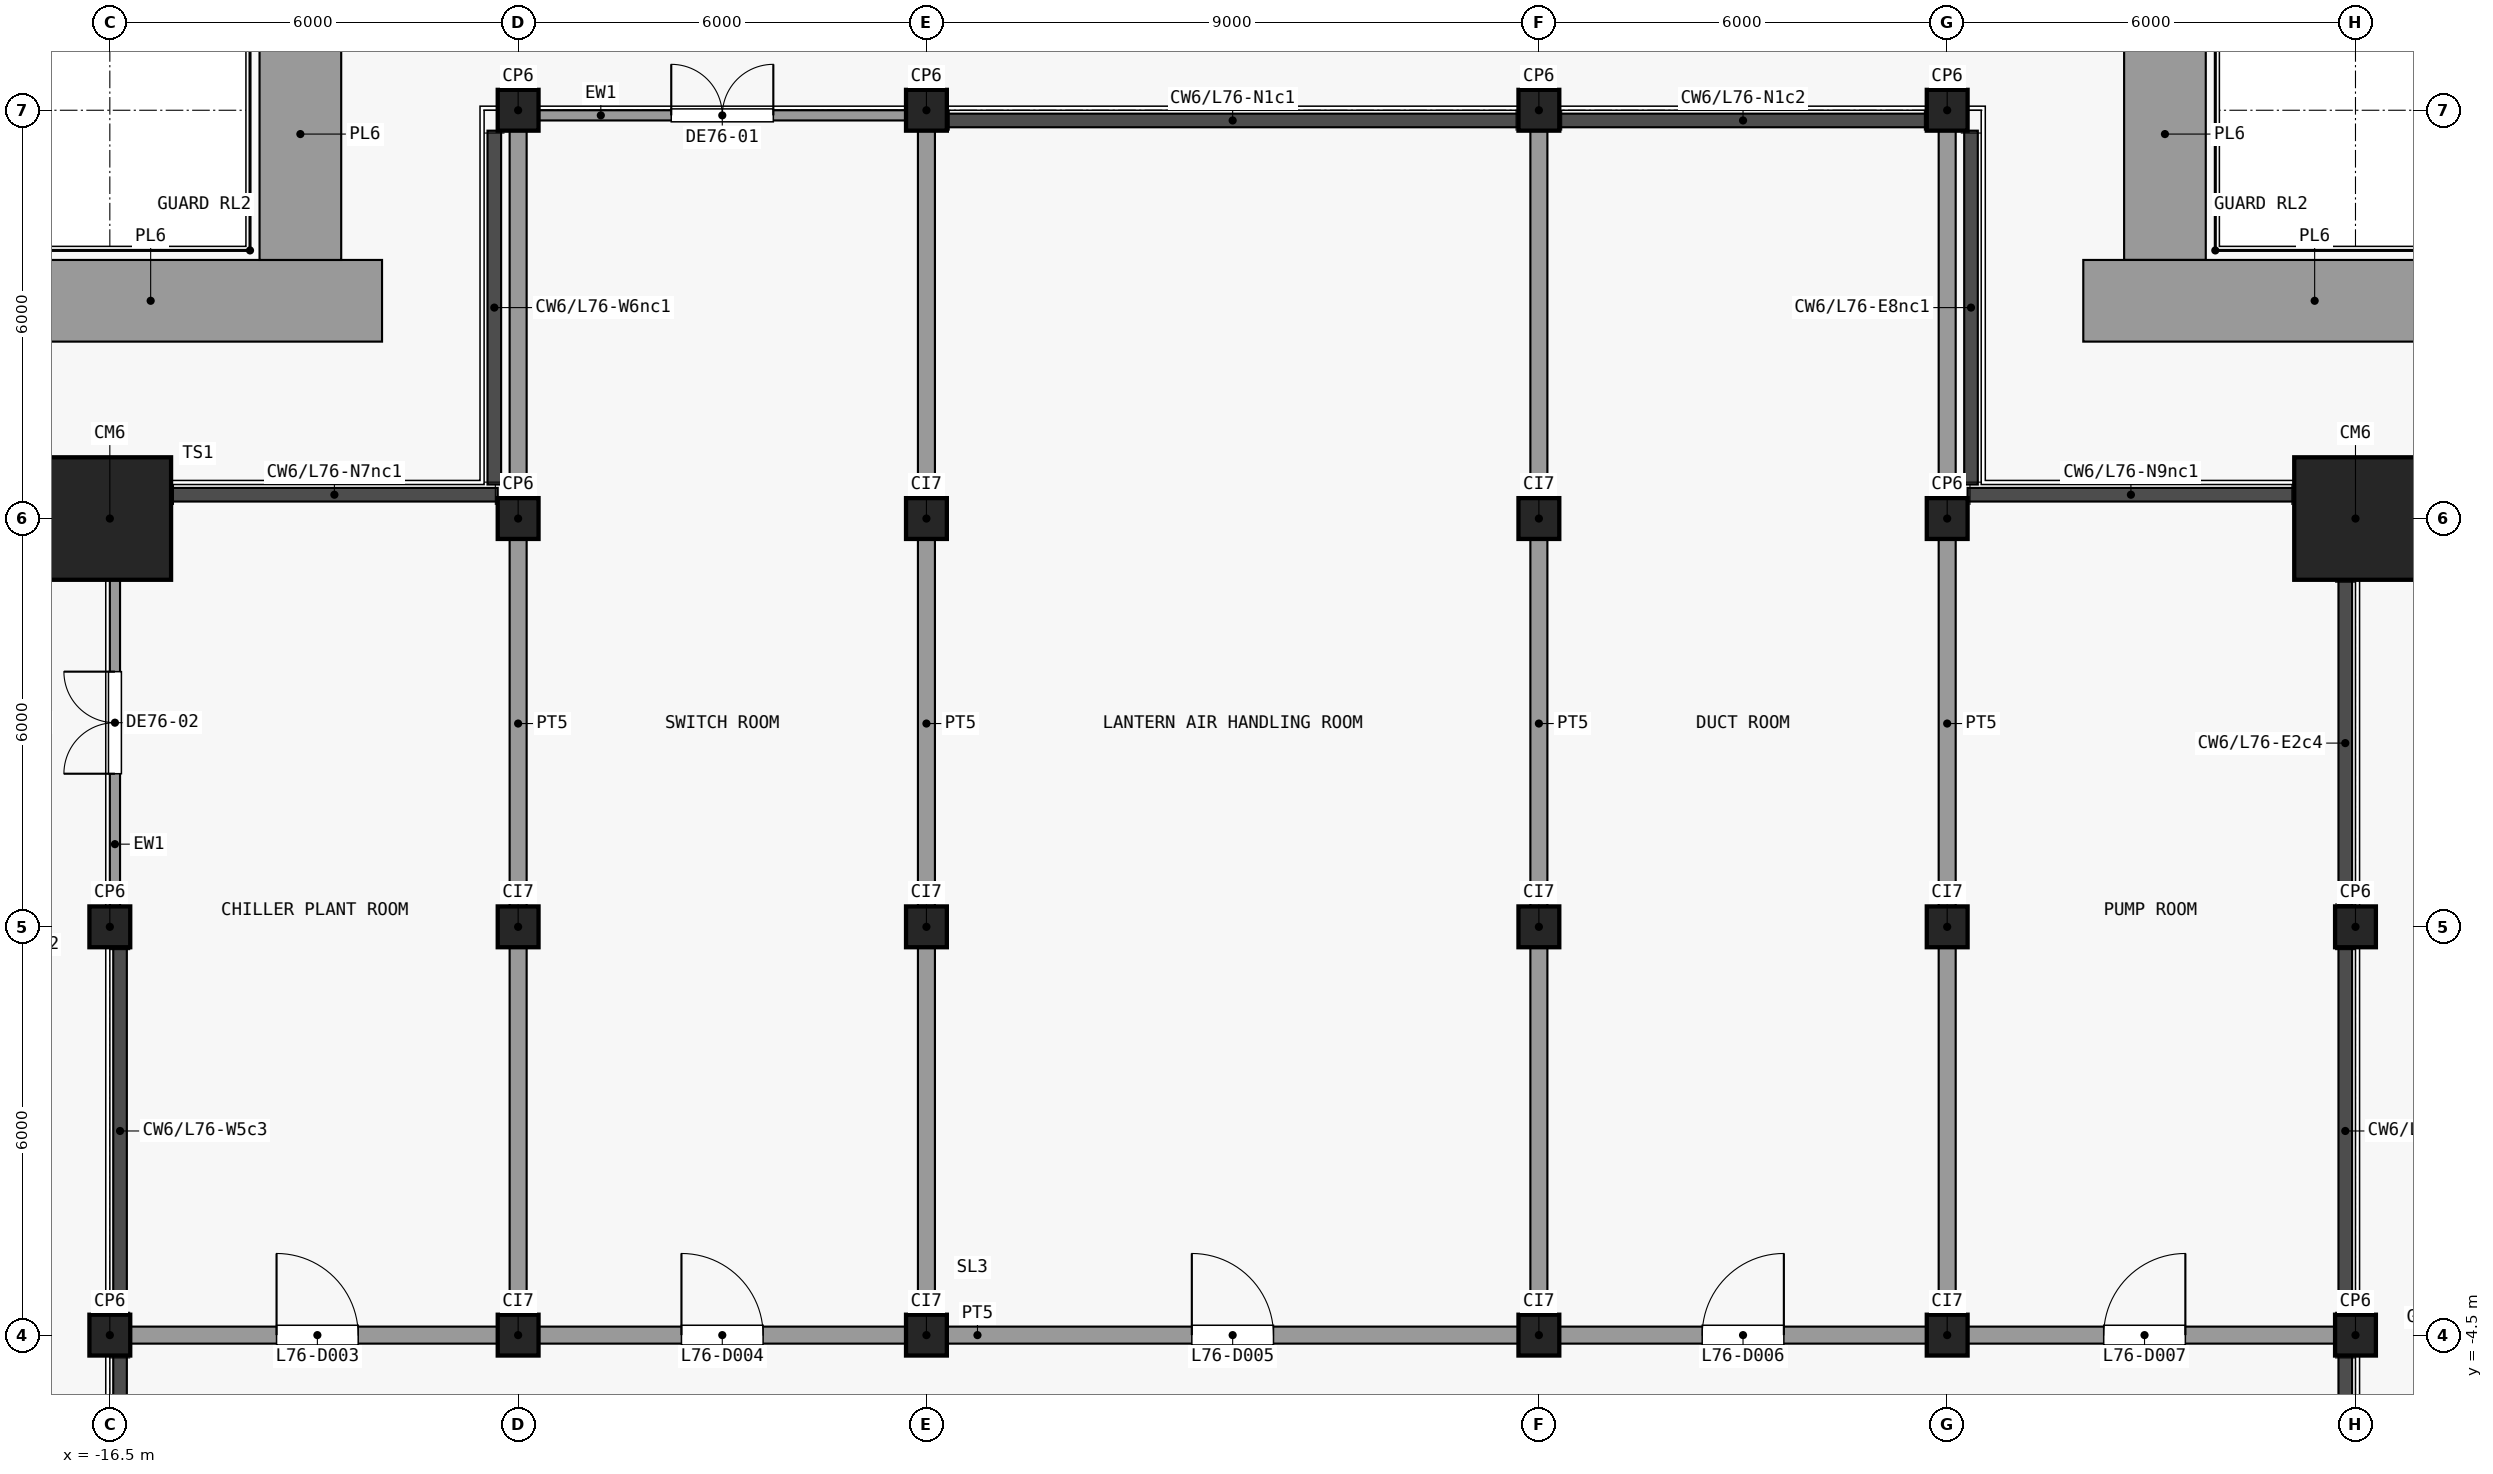
"""IFC4 building model, lengths in metres.
Left out: names, types, materials, properties, quantities, classifications, styles, units other than length and angle.
Written with IfcOpenShell. Run it as: python <this file> out.ifc"""

import sys

from ifc_helpers import new_model, si_unit, direction, frame, frame_2d, origin, origin_2d, place, context, subcontext, project, spatial, rectangle, extrude, element, fill, save


model = new_model("IFC4")
c1 = context("Model", 3, precision=1e-05, world=origin(), true_north=direction((0.0, 1.0)))
c2 = subcontext(c1, "Body", "Model", "MODEL_VIEW")
j1 = project(units=[si_unit("LENGTHUNIT", "METRE"), si_unit("PLANEANGLEUNIT", "RADIAN")], contexts=[c1])
p1 = place(None, origin())
s1 = spatial("IfcSite", under=j1, at=p1, CompositionType="ELEMENT")
p2 = place(p1, origin())
s2 = spatial("IfcBuilding", under=s1, at=p2, CompositionType="ELEMENT")
p3 = place(p2, frame((0.0, 0.0, 298.7)))
s3 = spatial("IfcBuildingStorey", under=s2, at=p3, CompositionType="ELEMENT", Elevation=298.7)
for number, where, z_axis, x_axis in (
    (1, (-16.5, -4.5, 0.0), (0.0, 0.0, 1.0), (1.0, 0.0, 0.0)),
    (2, (-16.5, 1.5, 0.0), (0.0, 0.0, 1.0), (1.0, 0.0, 0.0)),
):
    element("IfcColumn", number, at=place(p3, frame(where, z_axis=z_axis, x_axis=x_axis)), inside=s3, PredefinedType="COLUMN", context=c2, shape_type="SweptSolid", body=[
        extrude(rectangle(XDim=0.6, YDim=0.6, at=origin_2d()), origin(), (0.0, 0.0, 1.0), 4.5),
    ])
p4 = place(p3, frame((-16.5, 7.5, 0.0), z_axis=(0.0, 0.0, 1.0), x_axis=(1.0, 0.0, 0.0)))
e3 = element("IfcColumn", 3, at=p4, inside=s3, PredefinedType="COLUMN", context=c2, shape_type="SweptSolid", body=[
    extrude(rectangle(XDim=1.8, YDim=1.8, at=origin_2d()), origin(), (0.0, 0.0, 1.0), 4.5),
])
for number, where, z_axis, x_axis in (
    (4, (-10.5, -4.5, 0.0), (0.0, 0.0, 1.0), (1.0, 0.0, 0.0)),
    (5, (-10.5, 1.5, 0.0), (0.0, 0.0, 1.0), (1.0, 0.0, 0.0)),
    (6, (-10.5, 7.5, 0.0), (0.0, 0.0, 1.0), (1.0, 0.0, 0.0)),
    (7, (-10.5, 13.5, 0.0), (0.0, 0.0, 1.0), (1.0, 0.0, 0.0)),
    (8, (-4.5, -4.5, 0.0), (0.0, 0.0, 1.0), (1.0, 0.0, 0.0)),
    (9, (-4.5, 1.5, 0.0), (0.0, 0.0, 1.0), (1.0, 0.0, 0.0)),
    (10, (-4.5, 7.5, 0.0), (0.0, 0.0, 1.0), (1.0, 0.0, 0.0)),
    (11, (-4.5, 13.5, 0.0), (0.0, 0.0, 1.0), (1.0, 0.0, 0.0)),
    (12, (4.5, -4.5, 0.0), (0.0, 0.0, 1.0), (1.0, 0.0, 0.0)),
    (13, (4.5, 1.5, 0.0), (0.0, 0.0, 1.0), (1.0, 0.0, 0.0)),
    (14, (4.5, 7.5, 0.0), (0.0, 0.0, 1.0), (1.0, 0.0, 0.0)),
    (15, (4.5, 13.5, 0.0), (0.0, 0.0, 1.0), (1.0, 0.0, 0.0)),
    (16, (10.5, -4.5, 0.0), (0.0, 0.0, 1.0), (1.0, 0.0, 0.0)),
    (17, (10.5, 1.5, 0.0), (0.0, 0.0, 1.0), (1.0, 0.0, 0.0)),
    (18, (10.5, 7.5, 0.0), (0.0, 0.0, 1.0), (1.0, 0.0, 0.0)),
    (19, (10.5, 13.5, 0.0), (0.0, 0.0, 1.0), (1.0, 0.0, 0.0)),
    (20, (16.5, -4.5, 0.0), (0.0, 0.0, 1.0), (1.0, 0.0, 0.0)),
    (21, (16.5, 1.5, 0.0), (0.0, 0.0, 1.0), (1.0, 0.0, 0.0)),
):
    element("IfcColumn", number, at=place(p3, frame(where, z_axis=z_axis, x_axis=x_axis)), inside=s3, PredefinedType="COLUMN", context=c2, shape_type="SweptSolid", body=[
        extrude(rectangle(XDim=0.6, YDim=0.6, at=origin_2d()), origin(), (0.0, 0.0, 1.0), 4.5),
    ])
p5 = place(p3, frame((16.5, 7.5, 0.0), z_axis=(0.0, 0.0, 1.0), x_axis=(1.0, 0.0, 0.0)))
e22 = element("IfcColumn", 22, at=p5, inside=s3, PredefinedType="COLUMN", context=c2, shape_type="SweptSolid", body=[
    extrude(rectangle(XDim=1.8, YDim=1.8, at=origin_2d()), origin(), (0.0, 0.0, 1.0), 4.5),
])
p6 = place(p3, frame((-10.2, 13.425, 0.0), z_axis=(0.0, 0.0, 1.0), x_axis=(1.0, 0.0, 0.0)))
e23 = element("IfcWall", 23, at=p6, inside=s3, PredefinedType="SOLIDWALL", context=c2, shape_type="SweptSolid", body=[
    extrude(rectangle(XDim=5.4, YDim=0.15, at=frame_2d((2.7, 0.0))), origin(), (0.0, 0.0, 1.0), 4.2),
])
p7 = place(p6, frame((1.95, 0.0, 0.0)))
e24 = element("IfcOpeningElement", 24, at=p7, cuts=e23, PredefinedType="OPENING", context=c2, shape_type="SweptSolid", body=[
    extrude(rectangle(XDim=1.5, YDim=2.4, at=frame_2d((0.75, 1.2))), frame((0.0, 0.085, 0.0), z_axis=(0.0, -1.0, 0.0), x_axis=(1.0, 0.0, 0.0)), (0.0, 0.0, 1.0), 0.17),
])
p8 = place(p3, frame((-16.425, 1.8, 0.0), z_axis=(0.0, 0.0, 1.0), x_axis=(0.0, 1.0, 0.0)))
e25 = element("IfcWall", 25, at=p8, inside=s3, PredefinedType="SOLIDWALL", context=c2, shape_type="SweptSolid", body=[
    extrude(rectangle(XDim=4.8, YDim=0.15, at=frame_2d((2.4, 0.0))), origin(), (0.0, 0.0, 1.0), 4.2),
])
p9 = place(p8, frame((1.95, 0.0, 0.0)))
e26 = element("IfcOpeningElement", 26, at=p9, cuts=e25, PredefinedType="OPENING", context=c2, shape_type="SweptSolid", body=[
    extrude(rectangle(XDim=1.5, YDim=2.4, at=frame_2d((0.75, 1.2))), frame((0.0, 0.085, 0.0), z_axis=(0.0, -1.0, 0.0), x_axis=(1.0, 0.0, 0.0)), (0.0, 0.0, 1.0), 0.17),
])
p10 = place(p3, frame((-19.3, 10.7, 0.0), z_axis=(0.0, 0.0, 1.0), x_axis=(1.0, 0.0, 0.0)))
e27 = element("IfcWall", 27, at=p10, inside=s3, PredefinedType="USERDEFINED", context=c2, shape_type="SweptSolid", body=[
    extrude(rectangle(XDim=6.8, YDim=1.2, at=frame_2d((3.4, 0.0))), origin(), (0.0, 0.0, 1.0), 0.9),
])
for number, where, z_axis, x_axis in (
    (28, (-13.7, 11.3, 0.0), (0.0, 0.0, 1.0), (0.0, 1.0, 0.0)),
    (29, (13.7, 11.3, 0.0), (0.0, 0.0, 1.0), (0.0, 1.0, 0.0)),
):
    element("IfcWall", number, at=place(p3, frame(where, z_axis=z_axis, x_axis=x_axis)), inside=s3, PredefinedType="USERDEFINED", context=c2, shape_type="SweptSolid", body=[
        extrude(rectangle(XDim=3.7, YDim=1.2, at=frame_2d((1.85, 0.0))), origin(), (0.0, 0.0, 1.0), 0.9),
    ])
p11 = place(p3, frame((12.5, 10.7, 0.0), z_axis=(0.0, 0.0, 1.0), x_axis=(1.0, 0.0, 0.0)))
e30 = element("IfcWall", 30, at=p11, inside=s3, PredefinedType="USERDEFINED", context=c2, shape_type="SweptSolid", body=[
    extrude(rectangle(XDim=6.8, YDim=1.2, at=frame_2d((3.4, 0.0))), origin(), (0.0, 0.0, 1.0), 0.9),
])
p12 = place(p3, frame((-16.35, -4.5, 0.0), z_axis=(0.0, 0.0, 1.0), x_axis=(1.0, 0.0, 0.0)))
e31 = element("IfcWall", 31, at=p12, inside=s3, PredefinedType="PARTITIONING", context=c2, shape_type="SweptSolid", body=[
    extrude(rectangle(XDim=32.7, YDim=0.25, at=frame_2d((16.35, 0.0))), origin(), (0.0, 0.0, 1.0), 4.2),
])
p13 = place(p12, frame((2.3, 0.0, 0.0)))
e32 = element("IfcOpeningElement", 32, at=p13, cuts=e31, PredefinedType="OPENING", context=c2, shape_type="SweptSolid", body=[
    extrude(rectangle(XDim=1.2, YDim=2.1, at=frame_2d((0.6, 1.05))), frame((0.0, 0.135, 0.0), z_axis=(0.0, -1.0, 0.0), x_axis=(1.0, 0.0, 0.0)), (0.0, 0.0, 1.0), 0.27),
])
p14 = place(p12, frame((8.25, 0.0, 0.0)))
e33 = element("IfcOpeningElement", 33, at=p14, cuts=e31, PredefinedType="OPENING", context=c2, shape_type="SweptSolid", body=[
    extrude(rectangle(XDim=1.2, YDim=2.1, at=frame_2d((0.6, 1.05))), frame((0.0, 0.135, 0.0), z_axis=(0.0, -1.0, 0.0), x_axis=(1.0, 0.0, 0.0)), (0.0, 0.0, 1.0), 0.27),
])
p15 = place(p12, frame((15.75, 0.0, 0.0)))
e34 = element("IfcOpeningElement", 34, at=p15, cuts=e31, PredefinedType="OPENING", context=c2, shape_type="SweptSolid", body=[
    extrude(rectangle(XDim=1.2, YDim=2.1, at=frame_2d((0.6, 1.05))), frame((0.0, 0.135, 0.0), z_axis=(0.0, -1.0, 0.0), x_axis=(1.0, 0.0, 0.0)), (0.0, 0.0, 1.0), 0.27),
])
p16 = place(p12, frame((23.25, 0.0, 0.0)))
e35 = element("IfcOpeningElement", 35, at=p16, cuts=e31, PredefinedType="OPENING", context=c2, shape_type="SweptSolid", body=[
    extrude(rectangle(XDim=1.2, YDim=2.1, at=frame_2d((0.6, 1.05))), frame((0.0, 0.135, 0.0), z_axis=(0.0, -1.0, 0.0), x_axis=(1.0, 0.0, 0.0)), (0.0, 0.0, 1.0), 0.27),
])
p17 = place(p12, frame((29.15, 0.0, 0.0)))
e36 = element("IfcOpeningElement", 36, at=p17, cuts=e31, PredefinedType="OPENING", context=c2, shape_type="SweptSolid", body=[
    extrude(rectangle(XDim=1.2, YDim=2.1, at=frame_2d((0.6, 1.05))), frame((0.0, 0.135, 0.0), z_axis=(0.0, -1.0, 0.0), x_axis=(1.0, 0.0, 0.0)), (0.0, 0.0, 1.0), 0.27),
])
for number, where, z_axis, x_axis in (
    (37, (-10.5, -4.375, 0.0), (0.0, 0.0, 1.0), (0.0, 1.0, 0.0)),
    (38, (-4.5, -4.375, 0.0), (0.0, 0.0, 1.0), (0.0, 1.0, 0.0)),
    (39, (4.5, -4.375, 0.0), (0.0, 0.0, 1.0), (0.0, 1.0, 0.0)),
    (40, (10.5, -4.375, 0.0), (0.0, 0.0, 1.0), (0.0, 1.0, 0.0)),
):
    element("IfcWall", number, at=place(p3, frame(where, z_axis=z_axis, x_axis=x_axis)), inside=s3, PredefinedType="PARTITIONING", context=c2, shape_type="SweptSolid", body=[
        extrude(rectangle(XDim=17.725, YDim=0.25, at=frame_2d((8.863, 0.0))), origin(), (0.0, 0.0, 1.0), 4.2),
    ])
p18 = place(p7, origin())
e41 = element("IfcDoor", 41, at=p18, inside=s3, OperationType="DOUBLE_DOOR_SINGLE_SWING", PredefinedType="DOOR", context=c2, shape_type="SweptSolid", body=[
    extrude(rectangle(XDim=1.5, YDim=2.4, at=frame_2d((0.75, 1.2))), frame((0.0, 0.025, 0.0), z_axis=(0.0, -1.0, 0.0), x_axis=(1.0, 0.0, 0.0)), (0.0, 0.0, 1.0), 0.05),
])
fill(e24, e41)
p19 = place(p9, origin())
e42 = element("IfcDoor", 42, at=p19, inside=s3, OperationType="DOUBLE_DOOR_SINGLE_SWING", PredefinedType="DOOR", context=c2, shape_type="SweptSolid", body=[
    extrude(rectangle(XDim=1.5, YDim=2.4, at=frame_2d((0.75, 1.2))), frame((0.0, 0.025, 0.0), z_axis=(0.0, -1.0, 0.0), x_axis=(1.0, 0.0, 0.0)), (0.0, 0.0, 1.0), 0.05),
])
fill(e26, e42)
p20 = place(p13, origin())
e43 = element("IfcDoor", 43, at=p20, inside=s3, OperationType="SINGLE_SWING_RIGHT", PredefinedType="DOOR", context=c2, shape_type="SweptSolid", body=[
    extrude(rectangle(XDim=1.2, YDim=2.1, at=frame_2d((0.6, 1.05))), frame((0.0, 0.025, 0.0), z_axis=(0.0, -1.0, 0.0), x_axis=(1.0, 0.0, 0.0)), (0.0, 0.0, 1.0), 0.05),
])
fill(e32, e43)
p21 = place(p14, origin())
e44 = element("IfcDoor", 44, at=p21, inside=s3, OperationType="SINGLE_SWING_RIGHT", PredefinedType="DOOR", context=c2, shape_type="SweptSolid", body=[
    extrude(rectangle(XDim=1.2, YDim=2.1, at=frame_2d((0.6, 1.05))), frame((0.0, 0.025, 0.0), z_axis=(0.0, -1.0, 0.0), x_axis=(1.0, 0.0, 0.0)), (0.0, 0.0, 1.0), 0.05),
])
fill(e33, e44)
p22 = place(p15, origin())
e45 = element("IfcDoor", 45, at=p22, inside=s3, OperationType="SINGLE_SWING_RIGHT", PredefinedType="DOOR", context=c2, shape_type="SweptSolid", body=[
    extrude(rectangle(XDim=1.2, YDim=2.1, at=frame_2d((0.6, 1.05))), frame((0.0, 0.025, 0.0), z_axis=(0.0, -1.0, 0.0), x_axis=(1.0, 0.0, 0.0)), (0.0, 0.0, 1.0), 0.05),
])
fill(e34, e45)
p23 = place(p16, origin())
e46 = element("IfcDoor", 46, at=p23, inside=s3, OperationType="SINGLE_SWING_LEFT", PredefinedType="DOOR", context=c2, shape_type="SweptSolid", body=[
    extrude(rectangle(XDim=1.2, YDim=2.1, at=frame_2d((0.6, 1.05))), frame((0.0, 0.025, 0.0), z_axis=(0.0, -1.0, 0.0), x_axis=(1.0, 0.0, 0.0)), (0.0, 0.0, 1.0), 0.05),
])
fill(e35, e46)
p24 = place(p17, origin())
e47 = element("IfcDoor", 47, at=p24, inside=s3, OperationType="SINGLE_SWING_LEFT", PredefinedType="DOOR", context=c2, shape_type="SweptSolid", body=[
    extrude(rectangle(XDim=1.2, YDim=2.1, at=frame_2d((0.6, 1.05))), frame((0.0, 0.025, 0.0), z_axis=(0.0, -1.0, 0.0), x_axis=(1.0, 0.0, 0.0)), (0.0, 0.0, 1.0), 0.05),
])
fill(e36, e47)
save(model, sys.argv[1])
